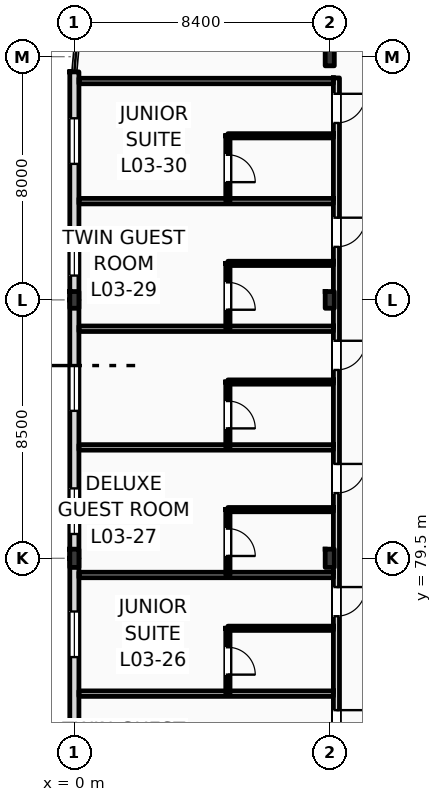
"""IFC4 building model, lengths in metres.
Left out: names, types, materials, properties, quantities, classifications, styles, units other than length and angle.
Written with IfcOpenShell. Run it as: python <this file> out.ifc"""

import sys

from ifc_helpers import new_model, si_unit, direction, frame, frame_2d, origin, origin_2d, place, context, subcontext, project, spatial, rectangle, i_section, extrude, element, fill, save


model = new_model("IFC4")
c1 = context("Model", 3, precision=1e-05, world=origin(), true_north=direction((0.0, 1.0)))
c2 = subcontext(c1, "Body", "Model", "MODEL_VIEW")
j1 = project(units=[si_unit("LENGTHUNIT", "METRE"), si_unit("PLANEANGLEUNIT", "RADIAN")], contexts=[c1])
p1 = place(None, origin())
s1 = spatial("IfcSite", under=j1, at=p1, CompositionType="ELEMENT")
p2 = place(p1, origin())
s2 = spatial("IfcBuilding", under=s1, at=p2, CompositionType="ELEMENT")
p3 = place(p2, frame((0.0, 0.0, 16.2)))
s3 = spatial("IfcBuildingStorey", under=s2, at=p3, CompositionType="ELEMENT", Elevation=16.2)
p4 = place(p3, frame((0.0, 79.5, 0.0), z_axis=(0.0, 0.0, 1.0), x_axis=(1.0, 0.0, 0.0)))
e1 = element("IfcColumn", 1, at=p4, inside=s3, PredefinedType="COLUMN", context=c2, shape_type="SweptSolid", body=[
    extrude(i_section(OverallWidth=0.3, OverallDepth=0.6, WebThickness=0.015, FlangeThickness=0.03, FilletRadius=0.027, at=origin_2d()), origin(), (0.0, 0.0, 1.0), 4.2),
])
p5 = place(p3, frame((0.0, 88.0, 0.0), z_axis=(0.0, 0.0, 1.0), x_axis=(1.0, 0.0, 0.0)))
e2 = element("IfcColumn", 2, at=p5, inside=s3, PredefinedType="COLUMN", context=c2, shape_type="SweptSolid", body=[
    extrude(i_section(OverallWidth=0.3, OverallDepth=0.55, WebThickness=0.015, FlangeThickness=0.029, FilletRadius=0.027, at=origin_2d()), origin(), (0.0, 0.0, 1.0), 4.2),
])
p6 = place(p3, frame((8.4, 79.5, 0.0), z_axis=(0.0, 0.0, 1.0), x_axis=(1.0, 0.0, 0.0)))
e3 = element("IfcColumn", 3, at=p6, inside=s3, PredefinedType="COLUMN", context=c2, shape_type="SweptSolid", body=[
    extrude(i_section(OverallWidth=0.3, OverallDepth=0.6, WebThickness=0.015, FlangeThickness=0.03, FilletRadius=0.027, at=origin_2d()), origin(), (0.0, 0.0, 1.0), 4.2),
])
p7 = place(p3, frame((8.4, 88.0, 0.0), z_axis=(0.0, 0.0, 1.0), x_axis=(1.0, 0.0, 0.0)))
e4 = element("IfcColumn", 4, at=p7, inside=s3, PredefinedType="COLUMN", context=c2, shape_type="SweptSolid", body=[
    extrude(i_section(OverallWidth=0.3, OverallDepth=0.55, WebThickness=0.015, FlangeThickness=0.029, FilletRadius=0.027, at=origin_2d()), origin(), (0.0, 0.0, 1.0), 4.2),
])
p8 = place(p3, frame((8.4, 96.0, 0.0), z_axis=(0.0, 0.0, 1.0), x_axis=(1.0, 0.0, 0.0)))
e5 = element("IfcColumn", 5, at=p8, inside=s3, PredefinedType="COLUMN", context=c2, shape_type="SweptSolid", body=[
    extrude(i_section(OverallWidth=0.3, OverallDepth=0.6, WebThickness=0.015, FlangeThickness=0.03, FilletRadius=0.027, at=origin_2d()), origin(), (0.0, 0.0, 1.0), 4.2),
])
p9 = place(p3, frame((0.0, 71.0, 0.0), z_axis=(0.0, 0.0, 1.0), x_axis=(0.0, 1.0, 0.0)))
e6 = element("IfcWall", 6, at=p9, inside=s3, PredefinedType="STANDARD", context=c2, shape_type="SweptSolid", body=[
    extrude(rectangle(XDim=8.5, YDim=0.3, at=frame_2d((4.25, 0.0))), origin(), (0.0, 0.0, 1.0), 3.51),
])
p10 = place(p9, frame((1.2, 0.0, 0.9)))
e7 = element("IfcOpeningElement", 7, at=p10, cuts=e6, PredefinedType="OPENING", context=c2, shape_type="SweptSolid", body=[
    extrude(rectangle(XDim=1.5, YDim=2.3, at=frame_2d((0.75, 1.15))), frame((0.0, 0.16, 0.0), z_axis=(0.0, -1.0, 0.0), x_axis=(1.0, 0.0, 0.0)), (0.0, 0.0, 1.0), 0.32),
])
p11 = place(p9, frame((5.25, 0.0, 0.9)))
e8 = element("IfcOpeningElement", 8, at=p11, cuts=e6, PredefinedType="OPENING", context=c2, shape_type="SweptSolid", body=[
    extrude(rectangle(XDim=1.5, YDim=2.43, at=frame_2d((0.75, 1.215))), frame((0.0, 0.16, 0.0), z_axis=(0.0, -1.0, 0.0), x_axis=(1.0, 0.0, 0.0)), (0.0, 0.0, 1.0), 0.32),
])
p12 = place(p3, frame((0.0, 79.5, 0.0), z_axis=(0.0, 0.0, 1.0), x_axis=(0.0, 1.0, 0.0)))
e9 = element("IfcWall", 9, at=p12, inside=s3, PredefinedType="STANDARD", context=c2, shape_type="SweptSolid", body=[
    extrude(rectangle(XDim=8.5, YDim=0.3, at=frame_2d((4.25, 0.0))), origin(), (0.0, 0.0, 1.0), 3.51),
])
p13 = place(p12, frame((0.799, 0.0, 0.9)))
e10 = element("IfcOpeningElement", 10, at=p13, cuts=e9, PredefinedType="OPENING", context=c2, shape_type="SweptSolid", body=[
    extrude(rectangle(XDim=1.5, YDim=2.43, at=frame_2d((0.75, 1.215))), frame((0.0, 0.16, 0.0), z_axis=(0.0, -1.0, 0.0), x_axis=(1.0, 0.0, 0.0)), (0.0, 0.0, 1.0), 0.32),
])
p14 = place(p12, frame((4.85, 0.0, 0.9)))
e11 = element("IfcOpeningElement", 11, at=p14, cuts=e9, PredefinedType="OPENING", context=c2, shape_type="SweptSolid", body=[
    extrude(rectangle(XDim=1.5, YDim=2.43, at=frame_2d((0.75, 1.215))), frame((0.0, 0.16, 0.0), z_axis=(0.0, -1.0, 0.0), x_axis=(1.0, 0.0, 0.0)), (0.0, 0.0, 1.0), 0.32),
])
p15 = place(p3, frame((0.0, 88.0, 0.0), z_axis=(0.0, 0.0, 1.0), x_axis=(0.0, 1.0, 0.0)))
e12 = element("IfcWall", 12, at=p15, inside=s3, PredefinedType="STANDARD", context=c2, shape_type="SweptSolid", body=[
    extrude(rectangle(XDim=7.5, YDim=0.3, at=frame_2d((3.75, 0.0))), origin(), (0.0, 0.0, 1.0), 3.92),
])
p16 = place(p15, frame((0.8, 0.0, 0.9)))
e13 = element("IfcOpeningElement", 13, at=p16, cuts=e12, PredefinedType="OPENING", context=c2, shape_type="SweptSolid", body=[
    extrude(rectangle(XDim=1.5, YDim=2.84, at=frame_2d((0.75, 1.42))), frame((0.0, 0.16, 0.0), z_axis=(0.0, -1.0, 0.0), x_axis=(1.0, 0.0, 0.0)), (0.0, 0.0, 1.0), 0.32),
])
p17 = place(p15, frame((4.474, 0.0, 0.9)))
e14 = element("IfcOpeningElement", 14, at=p17, cuts=e12, PredefinedType="OPENING", context=c2, shape_type="SweptSolid", body=[
    extrude(rectangle(XDim=1.5, YDim=2.84, at=frame_2d((0.75, 1.42))), frame((0.0, 0.16, 0.0), z_axis=(0.0, -1.0, 0.0), x_axis=(1.0, 0.0, 0.0)), (0.0, 0.0, 1.0), 0.32),
])
p18 = place(p3, frame((8.62, 62.64, 0.0), z_axis=(0.0, 0.0, 1.0), x_axis=(0.0, 1.0, 0.0)))
e15 = element("IfcWall", 15, at=p18, inside=s3, PredefinedType="PARTITIONING", context=c2, shape_type="SweptSolid", body=[
    extrude(rectangle(XDim=32.66, YDim=0.2, at=frame_2d((16.33, 0.0))), origin(), (0.0, 0.0, 1.0), 3.51),
])
p19 = place(p18, frame((2.829, 0.0, 0.0)))
e16 = element("IfcOpeningElement", 16, at=p19, cuts=e15, PredefinedType="OPENING", context=c2, shape_type="SweptSolid", body=[
    extrude(rectangle(XDim=0.96, YDim=2.2, at=frame_2d((0.48, 1.1))), frame((0.0, 0.11, 0.0), z_axis=(0.0, -1.0, 0.0), x_axis=(1.0, 0.0, 0.0)), (0.0, 0.0, 1.0), 0.22),
])
p20 = place(p18, frame((4.704, 0.0, 0.0)))
e17 = element("IfcOpeningElement", 17, at=p20, cuts=e15, PredefinedType="OPENING", context=c2, shape_type="SweptSolid", body=[
    extrude(rectangle(XDim=0.96, YDim=2.2, at=frame_2d((0.48, 1.1))), frame((0.0, 0.11, 0.0), z_axis=(0.0, -1.0, 0.0), x_axis=(1.0, 0.0, 0.0)), (0.0, 0.0, 1.0), 0.22),
])
p21 = place(p18, frame((10.905, 0.0, 0.0)))
e18 = element("IfcOpeningElement", 18, at=p21, cuts=e15, PredefinedType="OPENING", context=c2, shape_type="SweptSolid", body=[
    extrude(rectangle(XDim=0.96, YDim=2.2, at=frame_2d((0.48, 1.1))), frame((0.0, 0.11, 0.0), z_axis=(0.0, -1.0, 0.0), x_axis=(1.0, 0.0, 0.0)), (0.0, 0.0, 1.0), 0.22),
])
p22 = place(p18, frame((14.954, 0.0, 0.0)))
e19 = element("IfcOpeningElement", 19, at=p22, cuts=e15, PredefinedType="OPENING", context=c2, shape_type="SweptSolid", body=[
    extrude(rectangle(XDim=0.96, YDim=2.2, at=frame_2d((0.48, 1.1))), frame((0.0, 0.11, 0.0), z_axis=(0.0, -1.0, 0.0), x_axis=(1.0, 0.0, 0.0)), (0.0, 0.0, 1.0), 0.22),
])
p23 = place(p18, frame((19.004, 0.0, 0.0)))
e20 = element("IfcOpeningElement", 20, at=p23, cuts=e15, PredefinedType="OPENING", context=c2, shape_type="SweptSolid", body=[
    extrude(rectangle(XDim=0.96, YDim=2.2, at=frame_2d((0.48, 1.1))), frame((0.0, 0.11, 0.0), z_axis=(0.0, -1.0, 0.0), x_axis=(1.0, 0.0, 0.0)), (0.0, 0.0, 1.0), 0.22),
])
p24 = place(p18, frame((23.055, 0.0, 0.0)))
e21 = element("IfcOpeningElement", 21, at=p24, cuts=e15, PredefinedType="OPENING", context=c2, shape_type="SweptSolid", body=[
    extrude(rectangle(XDim=0.96, YDim=2.2, at=frame_2d((0.48, 1.1))), frame((0.0, 0.11, 0.0), z_axis=(0.0, -1.0, 0.0), x_axis=(1.0, 0.0, 0.0)), (0.0, 0.0, 1.0), 0.22),
])
p25 = place(p18, frame((27.104, 0.0, 0.0)))
e22 = element("IfcOpeningElement", 22, at=p25, cuts=e15, PredefinedType="OPENING", context=c2, shape_type="SweptSolid", body=[
    extrude(rectangle(XDim=0.96, YDim=2.2, at=frame_2d((0.48, 1.1))), frame((0.0, 0.11, 0.0), z_axis=(0.0, -1.0, 0.0), x_axis=(1.0, 0.0, 0.0)), (0.0, 0.0, 1.0), 0.22),
])
p26 = place(p18, frame((31.179, 0.0, 0.0)))
e23 = element("IfcOpeningElement", 23, at=p26, cuts=e15, PredefinedType="OPENING", context=c2, shape_type="SweptSolid", body=[
    extrude(rectangle(XDim=0.96, YDim=2.2, at=frame_2d((0.48, 1.1))), frame((0.0, 0.11, 0.0), z_axis=(0.0, -1.0, 0.0), x_axis=(1.0, 0.0, 0.0)), (0.0, 0.0, 1.0), 0.22),
])
for number, where, z_axis, x_axis in (
    (24, (0.15, 75.048, 0.0), (0.0, 0.0, 1.0), (1.0, 0.0, 0.0)),
    (25, (0.15, 78.951, 0.0), (0.0, 0.0, 1.0), (1.0, 0.0, 0.0)),
):
    element("IfcWall", number, at=place(p3, frame(where, z_axis=z_axis, x_axis=x_axis)), inside=s3, PredefinedType="PARTITIONING", context=c2, shape_type="SweptSolid", body=[
        extrude(rectangle(XDim=8.37, YDim=0.18, at=frame_2d((4.185, 0.0))), origin(), (0.0, 0.0, 1.0), 3.92),
    ])
p27 = place(p3, frame((5.05, 77.198, 0.0), z_axis=(0.0, 0.0, 1.0), x_axis=(1.0, 0.0, 0.0)))
e26 = element("IfcWall", 26, at=p27, inside=s3, PredefinedType="PARTITIONING", context=c2, shape_type="SweptSolid", body=[
    extrude(rectangle(XDim=3.47, YDim=0.14, at=frame_2d((1.735, 0.0))), origin(), (0.0, 0.0, 1.0), 3.92),
])
p28 = place(p3, frame((5.05, 75.048, 0.0), z_axis=(0.0, 0.0, 1.0), x_axis=(0.0, 1.0, 0.0)))
e27 = element("IfcWall", 27, at=p28, inside=s3, PredefinedType="PARTITIONING", context=c2, shape_type="SweptSolid", body=[
    extrude(rectangle(XDim=2.15, YDim=0.14, at=frame_2d((1.075, 0.0))), origin(), (0.0, 0.0, 1.0), 3.92),
])
p29 = place(p28, frame((0.625, 0.0, 0.0)))
e28 = element("IfcOpeningElement", 28, at=p29, cuts=e27, PredefinedType="OPENING", context=c2, shape_type="SweptSolid", body=[
    extrude(rectangle(XDim=0.9, YDim=2.1, at=frame_2d((0.45, 1.05))), frame((0.0, 0.08, 0.0), z_axis=(0.0, -1.0, 0.0), x_axis=(1.0, 0.0, 0.0)), (0.0, 0.0, 1.0), 0.16),
])
p30 = place(p3, frame((0.15, 83.148, 0.0), z_axis=(0.0, 0.0, 1.0), x_axis=(1.0, 0.0, 0.0)))
e29 = element("IfcWall", 29, at=p30, inside=s3, PredefinedType="PARTITIONING", context=c2, shape_type="SweptSolid", body=[
    extrude(rectangle(XDim=8.37, YDim=0.18, at=frame_2d((4.185, 0.0))), origin(), (0.0, 0.0, 1.0), 3.92),
])
p31 = place(p3, frame((5.05, 81.101, 0.0), z_axis=(0.0, 0.0, 1.0), x_axis=(1.0, 0.0, 0.0)))
e30 = element("IfcWall", 30, at=p31, inside=s3, PredefinedType="PARTITIONING", context=c2, shape_type="SweptSolid", body=[
    extrude(rectangle(XDim=3.47, YDim=0.14, at=frame_2d((1.735, 0.0))), origin(), (0.0, 0.0, 1.0), 3.92),
])
p32 = place(p3, frame((5.05, 78.951, 0.0), z_axis=(0.0, 0.0, 1.0), x_axis=(0.0, 1.0, 0.0)))
e31 = element("IfcWall", 31, at=p32, inside=s3, PredefinedType="PARTITIONING", context=c2, shape_type="SweptSolid", body=[
    extrude(rectangle(XDim=2.15, YDim=0.14, at=frame_2d((1.075, 0.0))), origin(), (0.0, 0.0, 1.0), 3.92),
])
p33 = place(p32, frame((0.625, 0.0, 0.0)))
e32 = element("IfcOpeningElement", 32, at=p33, cuts=e31, PredefinedType="OPENING", context=c2, shape_type="SweptSolid", body=[
    extrude(rectangle(XDim=0.9, YDim=2.1, at=frame_2d((0.45, 1.05))), frame((0.0, 0.08, 0.0), z_axis=(0.0, -1.0, 0.0), x_axis=(1.0, 0.0, 0.0)), (0.0, 0.0, 1.0), 0.16),
])
p34 = place(p3, frame((0.15, 87.051, 0.0), z_axis=(0.0, 0.0, 1.0), x_axis=(1.0, 0.0, 0.0)))
e33 = element("IfcWall", 33, at=p34, inside=s3, PredefinedType="PARTITIONING", context=c2, shape_type="SweptSolid", body=[
    extrude(rectangle(XDim=8.37, YDim=0.18, at=frame_2d((4.185, 0.0))), origin(), (0.0, 0.0, 1.0), 3.92),
])
p35 = place(p3, frame((5.05, 85.298, 0.0), z_axis=(0.0, 0.0, 1.0), x_axis=(1.0, 0.0, 0.0)))
e34 = element("IfcWall", 34, at=p35, inside=s3, PredefinedType="PARTITIONING", context=c2, shape_type="SweptSolid", body=[
    extrude(rectangle(XDim=3.47, YDim=0.14, at=frame_2d((1.735, 0.0))), origin(), (0.0, 0.0, 1.0), 3.92),
])
p36 = place(p3, frame((5.05, 83.148, 0.0), z_axis=(0.0, 0.0, 1.0), x_axis=(0.0, 1.0, 0.0)))
e35 = element("IfcWall", 35, at=p36, inside=s3, PredefinedType="PARTITIONING", context=c2, shape_type="SweptSolid", body=[
    extrude(rectangle(XDim=2.15, YDim=0.14, at=frame_2d((1.075, 0.0))), origin(), (0.0, 0.0, 1.0), 3.92),
])
p37 = place(p36, frame((0.625, 0.0, 0.0)))
e36 = element("IfcOpeningElement", 36, at=p37, cuts=e35, PredefinedType="OPENING", context=c2, shape_type="SweptSolid", body=[
    extrude(rectangle(XDim=0.9, YDim=2.1, at=frame_2d((0.45, 1.05))), frame((0.0, 0.08, 0.0), z_axis=(0.0, -1.0, 0.0), x_axis=(1.0, 0.0, 0.0)), (0.0, 0.0, 1.0), 0.16),
])
p38 = place(p3, frame((0.15, 91.248, 0.0), z_axis=(0.0, 0.0, 1.0), x_axis=(1.0, 0.0, 0.0)))
e37 = element("IfcWall", 37, at=p38, inside=s3, PredefinedType="PARTITIONING", context=c2, shape_type="SweptSolid", body=[
    extrude(rectangle(XDim=8.37, YDim=0.18, at=frame_2d((4.185, 0.0))), origin(), (0.0, 0.0, 1.0), 3.92),
])
p39 = place(p3, frame((5.05, 89.201, 0.0), z_axis=(0.0, 0.0, 1.0), x_axis=(1.0, 0.0, 0.0)))
e38 = element("IfcWall", 38, at=p39, inside=s3, PredefinedType="PARTITIONING", context=c2, shape_type="SweptSolid", body=[
    extrude(rectangle(XDim=3.47, YDim=0.14, at=frame_2d((1.735, 0.0))), origin(), (0.0, 0.0, 1.0), 3.92),
])
p40 = place(p3, frame((5.05, 87.051, 0.0), z_axis=(0.0, 0.0, 1.0), x_axis=(0.0, 1.0, 0.0)))
e39 = element("IfcWall", 39, at=p40, inside=s3, PredefinedType="PARTITIONING", context=c2, shape_type="SweptSolid", body=[
    extrude(rectangle(XDim=2.15, YDim=0.14, at=frame_2d((1.075, 0.0))), origin(), (0.0, 0.0, 1.0), 3.92),
])
p41 = place(p40, frame((0.625, 0.0, 0.0)))
e40 = element("IfcOpeningElement", 40, at=p41, cuts=e39, PredefinedType="OPENING", context=c2, shape_type="SweptSolid", body=[
    extrude(rectangle(XDim=0.9, YDim=2.1, at=frame_2d((0.45, 1.05))), frame((0.0, 0.08, 0.0), z_axis=(0.0, -1.0, 0.0), x_axis=(1.0, 0.0, 0.0)), (0.0, 0.0, 1.0), 0.16),
])
p42 = place(p3, frame((0.15, 95.2, 0.0), z_axis=(0.0, 0.0, 1.0), x_axis=(1.0, 0.0, 0.0)))
e41 = element("IfcWall", 41, at=p42, inside=s3, PredefinedType="PARTITIONING", context=c2, shape_type="SweptSolid", body=[
    extrude(rectangle(XDim=8.37, YDim=0.18, at=frame_2d((4.185, 0.0))), origin(), (0.0, 0.0, 1.0), 3.92),
])
p43 = place(p3, frame((5.05, 93.398, 0.0), z_axis=(0.0, 0.0, 1.0), x_axis=(1.0, 0.0, 0.0)))
e42 = element("IfcWall", 42, at=p43, inside=s3, PredefinedType="PARTITIONING", context=c2, shape_type="SweptSolid", body=[
    extrude(rectangle(XDim=3.47, YDim=0.14, at=frame_2d((1.735, 0.0))), origin(), (0.0, 0.0, 1.0), 3.92),
])
p44 = place(p3, frame((5.05, 91.248, 0.0), z_axis=(0.0, 0.0, 1.0), x_axis=(0.0, 1.0, 0.0)))
e43 = element("IfcWall", 43, at=p44, inside=s3, PredefinedType="PARTITIONING", context=c2, shape_type="SweptSolid", body=[
    extrude(rectangle(XDim=2.15, YDim=0.14, at=frame_2d((1.075, 0.0))), origin(), (0.0, 0.0, 1.0), 3.92),
])
p45 = place(p44, frame((0.625, 0.0, 0.0)))
e44 = element("IfcOpeningElement", 44, at=p45, cuts=e43, PredefinedType="OPENING", context=c2, shape_type="SweptSolid", body=[
    extrude(rectangle(XDim=0.9, YDim=2.1, at=frame_2d((0.45, 1.05))), frame((0.0, 0.08, 0.0), z_axis=(0.0, -1.0, 0.0), x_axis=(1.0, 0.0, 0.0)), (0.0, 0.0, 1.0), 0.16),
])
p46 = place(p11, origin())
e45 = element("IfcWindow", 45, at=p46, inside=s3, PartitioningType="DOUBLE_PANEL_VERTICAL", PredefinedType="WINDOW", context=c2, shape_type="SweptSolid", body=[
    extrude(rectangle(XDim=1.5, YDim=2.43, at=frame_2d((0.75, 1.215))), frame((0.0, 0.03, 0.0), z_axis=(0.0, -1.0, 0.0), x_axis=(1.0, 0.0, 0.0)), (0.0, 0.0, 1.0), 0.06),
])
fill(e8, e45)
p47 = place(p13, origin())
e46 = element("IfcWindow", 46, at=p47, inside=s3, PartitioningType="DOUBLE_PANEL_VERTICAL", PredefinedType="WINDOW", context=c2, shape_type="SweptSolid", body=[
    extrude(rectangle(XDim=1.5, YDim=2.43, at=frame_2d((0.75, 1.215))), frame((0.0, 0.03, 0.0), z_axis=(0.0, -1.0, 0.0), x_axis=(1.0, 0.0, 0.0)), (0.0, 0.0, 1.0), 0.06),
])
fill(e10, e46)
p48 = place(p14, origin())
e47 = element("IfcWindow", 47, at=p48, inside=s3, PartitioningType="DOUBLE_PANEL_VERTICAL", PredefinedType="WINDOW", context=c2, shape_type="SweptSolid", body=[
    extrude(rectangle(XDim=1.5, YDim=2.43, at=frame_2d((0.75, 1.215))), frame((0.0, 0.03, 0.0), z_axis=(0.0, -1.0, 0.0), x_axis=(1.0, 0.0, 0.0)), (0.0, 0.0, 1.0), 0.06),
])
fill(e11, e47)
p49 = place(p16, origin())
e48 = element("IfcWindow", 48, at=p49, inside=s3, PartitioningType="DOUBLE_PANEL_VERTICAL", PredefinedType="WINDOW", context=c2, shape_type="SweptSolid", body=[
    extrude(rectangle(XDim=1.5, YDim=2.84, at=frame_2d((0.75, 1.42))), frame((0.0, 0.03, 0.0), z_axis=(0.0, -1.0, 0.0), x_axis=(1.0, 0.0, 0.0)), (0.0, 0.0, 1.0), 0.06),
])
fill(e13, e48)
p50 = place(p17, origin())
e49 = element("IfcWindow", 49, at=p50, inside=s3, PartitioningType="DOUBLE_PANEL_VERTICAL", PredefinedType="WINDOW", context=c2, shape_type="SweptSolid", body=[
    extrude(rectangle(XDim=1.5, YDim=2.84, at=frame_2d((0.75, 1.42))), frame((0.0, 0.03, 0.0), z_axis=(0.0, -1.0, 0.0), x_axis=(1.0, 0.0, 0.0)), (0.0, 0.0, 1.0), 0.06),
])
fill(e14, e49)
p51 = place(p21, frame((0.96, 0.0, 0.0), z_axis=(0.0, 0.0, 1.0), x_axis=(-1.0, 0.0, 0.0)))
e50 = element("IfcDoor", 50, at=p51, inside=s3, OperationType="SINGLE_SWING_RIGHT", PredefinedType="DOOR", context=c2, shape_type="SweptSolid", body=[
    extrude(rectangle(XDim=0.96, YDim=2.2, at=frame_2d((0.48, 1.1))), frame((0.0, 0.025, 0.0), z_axis=(0.0, -1.0, 0.0), x_axis=(1.0, 0.0, 0.0)), (0.0, 0.0, 1.0), 0.05),
])
fill(e18, e50)
p52 = place(p22, frame((0.96, 0.0, 0.0), z_axis=(0.0, 0.0, 1.0), x_axis=(-1.0, 0.0, 0.0)))
e51 = element("IfcDoor", 51, at=p52, inside=s3, OperationType="SINGLE_SWING_RIGHT", PredefinedType="DOOR", context=c2, shape_type="SweptSolid", body=[
    extrude(rectangle(XDim=0.96, YDim=2.2, at=frame_2d((0.48, 1.1))), frame((0.0, 0.025, 0.0), z_axis=(0.0, -1.0, 0.0), x_axis=(1.0, 0.0, 0.0)), (0.0, 0.0, 1.0), 0.05),
])
fill(e19, e51)
p53 = place(p29, frame((0.9, 0.0, 0.0), z_axis=(0.0, 0.0, 1.0), x_axis=(-1.0, 0.0, 0.0)))
e52 = element("IfcDoor", 52, at=p53, inside=s3, OperationType="SINGLE_SWING_LEFT", PredefinedType="DOOR", context=c2, shape_type="SweptSolid", body=[
    extrude(rectangle(XDim=0.9, YDim=2.1, at=frame_2d((0.45, 1.05))), frame((0.0, 0.025, 0.0), z_axis=(0.0, -1.0, 0.0), x_axis=(1.0, 0.0, 0.0)), (0.0, 0.0, 1.0), 0.05),
])
fill(e28, e52)
p54 = place(p23, frame((0.96, 0.0, 0.0), z_axis=(0.0, 0.0, 1.0), x_axis=(-1.0, 0.0, 0.0)))
e53 = element("IfcDoor", 53, at=p54, inside=s3, OperationType="SINGLE_SWING_RIGHT", PredefinedType="DOOR", context=c2, shape_type="SweptSolid", body=[
    extrude(rectangle(XDim=0.96, YDim=2.2, at=frame_2d((0.48, 1.1))), frame((0.0, 0.025, 0.0), z_axis=(0.0, -1.0, 0.0), x_axis=(1.0, 0.0, 0.0)), (0.0, 0.0, 1.0), 0.05),
])
fill(e20, e53)
p55 = place(p33, frame((0.9, 0.0, 0.0), z_axis=(0.0, 0.0, 1.0), x_axis=(-1.0, 0.0, 0.0)))
e54 = element("IfcDoor", 54, at=p55, inside=s3, OperationType="SINGLE_SWING_LEFT", PredefinedType="DOOR", context=c2, shape_type="SweptSolid", body=[
    extrude(rectangle(XDim=0.9, YDim=2.1, at=frame_2d((0.45, 1.05))), frame((0.0, 0.025, 0.0), z_axis=(0.0, -1.0, 0.0), x_axis=(1.0, 0.0, 0.0)), (0.0, 0.0, 1.0), 0.05),
])
fill(e32, e54)
p56 = place(p24, frame((0.96, 0.0, 0.0), z_axis=(0.0, 0.0, 1.0), x_axis=(-1.0, 0.0, 0.0)))
e55 = element("IfcDoor", 55, at=p56, inside=s3, OperationType="SINGLE_SWING_RIGHT", PredefinedType="DOOR", context=c2, shape_type="SweptSolid", body=[
    extrude(rectangle(XDim=0.96, YDim=2.2, at=frame_2d((0.48, 1.1))), frame((0.0, 0.025, 0.0), z_axis=(0.0, -1.0, 0.0), x_axis=(1.0, 0.0, 0.0)), (0.0, 0.0, 1.0), 0.05),
])
fill(e21, e55)
p57 = place(p37, frame((0.9, 0.0, 0.0), z_axis=(0.0, 0.0, 1.0), x_axis=(-1.0, 0.0, 0.0)))
e56 = element("IfcDoor", 56, at=p57, inside=s3, OperationType="SINGLE_SWING_LEFT", PredefinedType="DOOR", context=c2, shape_type="SweptSolid", body=[
    extrude(rectangle(XDim=0.9, YDim=2.1, at=frame_2d((0.45, 1.05))), frame((0.0, 0.025, 0.0), z_axis=(0.0, -1.0, 0.0), x_axis=(1.0, 0.0, 0.0)), (0.0, 0.0, 1.0), 0.05),
])
fill(e36, e56)
p58 = place(p25, frame((0.96, 0.0, 0.0), z_axis=(0.0, 0.0, 1.0), x_axis=(-1.0, 0.0, 0.0)))
e57 = element("IfcDoor", 57, at=p58, inside=s3, OperationType="SINGLE_SWING_RIGHT", PredefinedType="DOOR", context=c2, shape_type="SweptSolid", body=[
    extrude(rectangle(XDim=0.96, YDim=2.2, at=frame_2d((0.48, 1.1))), frame((0.0, 0.025, 0.0), z_axis=(0.0, -1.0, 0.0), x_axis=(1.0, 0.0, 0.0)), (0.0, 0.0, 1.0), 0.05),
])
fill(e22, e57)
p59 = place(p41, frame((0.9, 0.0, 0.0), z_axis=(0.0, 0.0, 1.0), x_axis=(-1.0, 0.0, 0.0)))
e58 = element("IfcDoor", 58, at=p59, inside=s3, OperationType="SINGLE_SWING_LEFT", PredefinedType="DOOR", context=c2, shape_type="SweptSolid", body=[
    extrude(rectangle(XDim=0.9, YDim=2.1, at=frame_2d((0.45, 1.05))), frame((0.0, 0.025, 0.0), z_axis=(0.0, -1.0, 0.0), x_axis=(1.0, 0.0, 0.0)), (0.0, 0.0, 1.0), 0.05),
])
fill(e40, e58)
p60 = place(p26, frame((0.96, 0.0, 0.0), z_axis=(0.0, 0.0, 1.0), x_axis=(-1.0, 0.0, 0.0)))
e59 = element("IfcDoor", 59, at=p60, inside=s3, OperationType="SINGLE_SWING_RIGHT", PredefinedType="DOOR", context=c2, shape_type="SweptSolid", body=[
    extrude(rectangle(XDim=0.96, YDim=2.2, at=frame_2d((0.48, 1.1))), frame((0.0, 0.025, 0.0), z_axis=(0.0, -1.0, 0.0), x_axis=(1.0, 0.0, 0.0)), (0.0, 0.0, 1.0), 0.05),
])
fill(e23, e59)
p61 = place(p45, frame((0.9, 0.0, 0.0), z_axis=(0.0, 0.0, 1.0), x_axis=(-1.0, 0.0, 0.0)))
e60 = element("IfcDoor", 60, at=p61, inside=s3, OperationType="SINGLE_SWING_LEFT", PredefinedType="DOOR", context=c2, shape_type="SweptSolid", body=[
    extrude(rectangle(XDim=0.9, YDim=2.1, at=frame_2d((0.45, 1.05))), frame((0.0, 0.025, 0.0), z_axis=(0.0, -1.0, 0.0), x_axis=(1.0, 0.0, 0.0)), (0.0, 0.0, 1.0), 0.05),
])
fill(e44, e60)
save(model, sys.argv[1])
